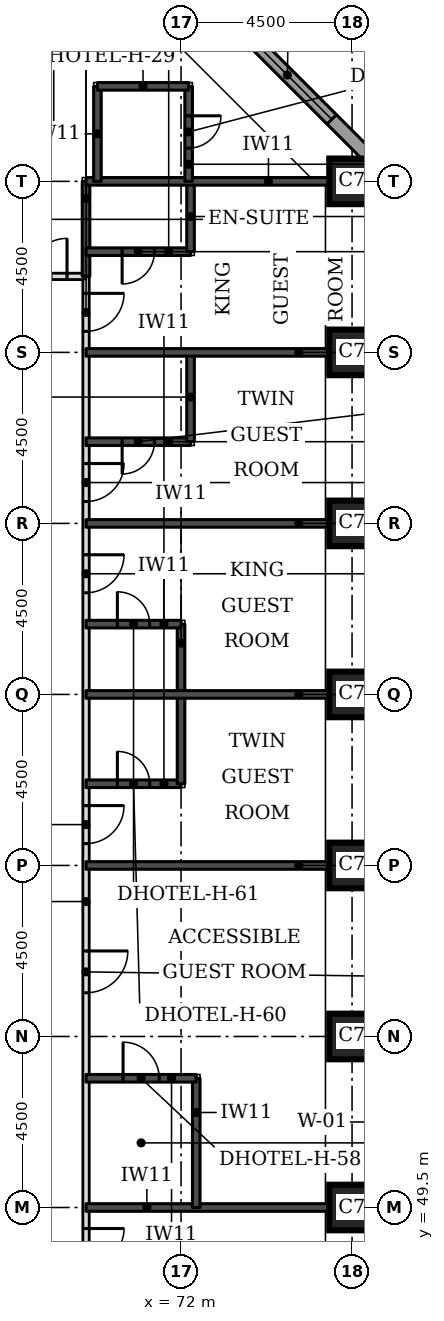
"""IFC4 building model, lengths in metres.
Left out: names, types, materials, properties, quantities, classifications, styles, units other than length and angle.
Written with IfcOpenShell. Run it as: python <this file> out.ifc"""

import sys

from ifc_helpers import new_model, si_unit, direction, frame, frame_2d, origin, origin_2d, place, context, subcontext, project, spatial, rectangle, extrude, element, fill, save


model = new_model("IFC4")
c1 = context("Model", 3, precision=1e-05, world=origin(), true_north=direction((0.0, 1.0)))
c2 = subcontext(c1, "Body", "Model", "MODEL_VIEW")
j1 = project(units=[si_unit("LENGTHUNIT", "METRE"), si_unit("PLANEANGLEUNIT", "RADIAN")], contexts=[c1])
p1 = place(None, origin())
s1 = spatial("IfcSite", under=j1, at=p1, CompositionType="ELEMENT")
p2 = place(p1, origin())
s2 = spatial("IfcBuilding", under=s1, at=p2, CompositionType="ELEMENT")
p3 = place(p2, frame((0.0, 0.0, 46.2)))
s3 = spatial("IfcBuildingStorey", under=s2, at=p3, CompositionType="ELEMENT", Elevation=46.2)
for number, where, z_axis, x_axis in (
    (1, (76.5, 49.5, 0.0), (0.0, 0.0, 1.0), (1.0, 0.0, 0.0)),
    (2, (76.5, 54.0, 0.0), (0.0, 0.0, 1.0), (1.0, 0.0, 0.0)),
    (3, (76.5, 58.5, 0.0), (0.0, 0.0, 1.0), (1.0, 0.0, 0.0)),
    (4, (76.5, 63.0, 0.0), (0.0, 0.0, 1.0), (1.0, 0.0, 0.0)),
    (5, (76.5, 67.5, 0.0), (0.0, 0.0, 1.0), (1.0, 0.0, 0.0)),
    (6, (76.5, 72.0, 0.0), (0.0, 0.0, 1.0), (1.0, 0.0, 0.0)),
    (7, (76.5, 76.5, 0.0), (0.0, 0.0, 1.0), (1.0, 0.0, 0.0)),
):
    element("IfcColumn", number, at=place(p3, frame(where, z_axis=z_axis, x_axis=x_axis)), inside=s3, PredefinedType="COLUMN", context=c2, shape_type="SweptSolid", body=[
        extrude(rectangle(XDim=1.2, YDim=1.2, at=origin_2d()), origin(), (0.0, 0.0, 1.0), 3.3),
    ])
p4 = place(p3, frame((77.326, 76.77, 0.0), z_axis=(0.0, 0.0, 1.0), x_axis=(-0.707106781187, 0.707106781187, 0.0)))
e8 = element("IfcWall", 8, at=p4, inside=s3, PredefinedType="STANDARD", context=c2, shape_type="SweptSolid", body=[
    extrude(rectangle(XDim=7.151, YDim=0.35, at=frame_2d((3.576, 0.0))), origin(), (0.0, 0.0, 1.0), 3.055),
])
p5 = place(p4, frame((1.926, 0.0, 0.8)))
e9 = element("IfcOpeningElement", 9, at=p5, cuts=e8, PredefinedType="OPENING", context=c2, shape_type="SweptSolid", body=[
    extrude(rectangle(XDim=3.3, YDim=1.5, at=frame_2d((1.65, 0.75))), frame((0.0, 0.185, 0.0), z_axis=(0.0, -1.0, 0.0), x_axis=(1.0, 0.0, 0.0)), (0.0, 0.0, 1.0), 0.37),
])
p6 = place(p3, frame((69.5, 47.5, 0.0), z_axis=(0.0, 0.0, 1.0), x_axis=(0.0, 1.0, 0.0)))
e10 = element("IfcWall", 10, at=p6, inside=s3, PredefinedType="PARTITIONING", context=c2, shape_type="SweptSolid", body=[
    extrude(rectangle(XDim=26.5, YDim=0.15, at=frame_2d((13.25, 0.0))), origin(), (0.0, 0.0, 1.0), 3.08),
])
p7 = place(p6, frame((25.053, 0.0, 0.0)))
e11 = element("IfcOpeningElement", 11, at=p7, cuts=e10, PredefinedType="OPENING", context=c2, shape_type="SweptSolid", body=[
    extrude(rectangle(XDim=1.0, YDim=2.1, at=frame_2d((0.5, 1.05))), frame((0.0, 0.085, 0.0), z_axis=(0.0, -1.0, 0.0), x_axis=(1.0, 0.0, 0.0)), (0.0, 0.0, 1.0), 0.17),
])
p8 = place(p6, frame((20.575, 0.0, 0.0)))
e12 = element("IfcOpeningElement", 12, at=p8, cuts=e10, PredefinedType="OPENING", context=c2, shape_type="SweptSolid", body=[
    extrude(rectangle(XDim=1.0, YDim=2.1, at=frame_2d((0.5, 1.05))), frame((0.0, 0.085, 0.0), z_axis=(0.0, -1.0, 0.0), x_axis=(1.0, 0.0, 0.0)), (0.0, 0.0, 1.0), 0.17),
])
p9 = place(p6, frame((18.175, 0.0, 0.0)))
e13 = element("IfcOpeningElement", 13, at=p9, cuts=e10, PredefinedType="OPENING", context=c2, shape_type="SweptSolid", body=[
    extrude(rectangle(XDim=1.0, YDim=2.1, at=frame_2d((0.5, 1.05))), frame((0.0, 0.085, 0.0), z_axis=(0.0, -1.0, 0.0), x_axis=(1.0, 0.0, 0.0)), (0.0, 0.0, 1.0), 0.17),
])
p10 = place(p6, frame((11.575, 0.0, 0.0)))
e14 = element("IfcOpeningElement", 14, at=p10, cuts=e10, PredefinedType="OPENING", context=c2, shape_type="SweptSolid", body=[
    extrude(rectangle(XDim=1.0, YDim=2.1, at=frame_2d((0.5, 1.05))), frame((0.0, 0.085, 0.0), z_axis=(0.0, -1.0, 0.0), x_axis=(1.0, 0.0, 0.0)), (0.0, 0.0, 1.0), 0.17),
])
p11 = place(p6, frame((7.65, 0.0, 0.0)))
e15 = element("IfcOpeningElement", 15, at=p11, cuts=e10, PredefinedType="OPENING", context=c2, shape_type="SweptSolid", body=[
    extrude(rectangle(XDim=1.1, YDim=2.1, at=frame_2d((0.55, 1.05))), frame((0.0, 0.085, 0.0), z_axis=(0.0, -1.0, 0.0), x_axis=(1.0, 0.0, 0.0)), (0.0, 0.0, 1.0), 0.17),
])
p12 = place(p6, frame((0.447, 0.0, 0.0)))
e16 = element("IfcOpeningElement", 16, at=p12, cuts=e10, PredefinedType="OPENING", context=c2, shape_type="SweptSolid", body=[
    extrude(rectangle(XDim=1.0, YDim=2.1, at=frame_2d((0.5, 1.05))), frame((0.0, 0.085, 0.0), z_axis=(0.0, -1.0, 0.0), x_axis=(1.0, 0.0, 0.0)), (0.0, 0.0, 1.0), 0.17),
])
p13 = place(p3, frame((43.0, 74.0, 0.0), z_axis=(0.0, 0.0, 1.0), x_axis=(1.0, 0.0, 0.0)))
e17 = element("IfcWall", 17, at=p13, inside=s3, PredefinedType="PARTITIONING", context=c2, shape_type="SweptSolid", body=[
    extrude(rectangle(XDim=26.5, YDim=0.15, at=frame_2d((13.25, 0.0))), origin(), (0.0, 0.0, 1.0), 3.08),
])
p14 = place(p13, frame((2.575, 0.0, 0.0)))
e18 = element("IfcOpeningElement", 18, at=p14, cuts=e17, PredefinedType="OPENING", context=c2, shape_type="SweptSolid", body=[
    extrude(rectangle(XDim=1.0, YDim=2.1, at=frame_2d((0.5, 1.05))), frame((0.0, 0.085, 0.0), z_axis=(0.0, -1.0, 0.0), x_axis=(1.0, 0.0, 0.0)), (0.0, 0.0, 1.0), 0.17),
])
p15 = place(p13, frame((9.175, 0.0, 0.0)))
e19 = element("IfcOpeningElement", 19, at=p15, cuts=e17, PredefinedType="OPENING", context=c2, shape_type="SweptSolid", body=[
    extrude(rectangle(XDim=1.0, YDim=2.1, at=frame_2d((0.5, 1.05))), frame((0.0, 0.085, 0.0), z_axis=(0.0, -1.0, 0.0), x_axis=(1.0, 0.0, 0.0)), (0.0, 0.0, 1.0), 0.17),
])
p16 = place(p13, frame((11.575, 0.0, 0.0)))
e20 = element("IfcOpeningElement", 20, at=p16, cuts=e17, PredefinedType="OPENING", context=c2, shape_type="SweptSolid", body=[
    extrude(rectangle(XDim=1.0, YDim=2.1, at=frame_2d((0.5, 1.05))), frame((0.0, 0.085, 0.0), z_axis=(0.0, -1.0, 0.0), x_axis=(1.0, 0.0, 0.0)), (0.0, 0.0, 1.0), 0.17),
])
p17 = place(p13, frame((18.175, 0.0, 0.0)))
e21 = element("IfcOpeningElement", 21, at=p17, cuts=e17, PredefinedType="OPENING", context=c2, shape_type="SweptSolid", body=[
    extrude(rectangle(XDim=1.0, YDim=2.1, at=frame_2d((0.5, 1.05))), frame((0.0, 0.085, 0.0), z_axis=(0.0, -1.0, 0.0), x_axis=(1.0, 0.0, 0.0)), (0.0, 0.0, 1.0), 0.17),
])
p18 = place(p13, frame((20.575, 0.0, 0.0)))
e22 = element("IfcOpeningElement", 22, at=p18, cuts=e17, PredefinedType="OPENING", context=c2, shape_type="SweptSolid", body=[
    extrude(rectangle(XDim=1.0, YDim=2.1, at=frame_2d((0.5, 1.05))), frame((0.0, 0.085, 0.0), z_axis=(0.0, -1.0, 0.0), x_axis=(1.0, 0.0, 0.0)), (0.0, 0.0, 1.0), 0.17),
])
p19 = place(p13, frame((0.5, 0.0, 0.0)))
e23 = element("IfcOpeningElement", 23, at=p19, cuts=e17, PredefinedType="OPENING", context=c2, shape_type="SweptSolid", body=[
    extrude(rectangle(XDim=1.0, YDim=2.1, at=frame_2d((0.5, 1.05))), frame((0.0, 0.085, 0.0), z_axis=(0.0, -1.0, 0.0), x_axis=(1.0, 0.0, 0.0)), (0.0, 0.0, 1.0), 0.17),
])
p20 = place(p13, frame((25.0, 0.0, 0.0)))
e24 = element("IfcOpeningElement", 24, at=p20, cuts=e17, PredefinedType="OPENING", context=c2, shape_type="SweptSolid", body=[
    extrude(rectangle(XDim=1.0, YDim=2.1, at=frame_2d((0.5, 1.05))), frame((0.0, 0.085, 0.0), z_axis=(0.0, -1.0, 0.0), x_axis=(1.0, 0.0, 0.0)), (0.0, 0.0, 1.0), 0.17),
])
p21 = place(p3, frame((69.5, 49.5, 0.0), z_axis=(0.0, 0.0, 1.0), x_axis=(1.0, 0.0, 0.0)))
e25 = element("IfcWall", 25, at=p21, inside=s3, PredefinedType="SOLIDWALL", context=c2, shape_type="SweptSolid", body=[
    extrude(rectangle(XDim=6.4, YDim=0.2, at=frame_2d((3.2, 0.0))), origin(), (0.0, 0.0, 1.0), 3.08),
])
p22 = place(p3, frame((72.4, 49.5, 0.0), z_axis=(0.0, 0.0, 1.0), x_axis=(0.0, 1.0, 0.0)))
e26 = element("IfcWall", 26, at=p22, inside=s3, PredefinedType="SOLIDWALL", context=c2, shape_type="SweptSolid", body=[
    extrude(rectangle(XDim=3.4, YDim=0.2, at=frame_2d((1.7, 0.0))), origin(), (0.0, 0.0, 1.0), 3.08),
])
p23 = place(p3, frame((69.5, 52.9, 0.0), z_axis=(0.0, 0.0, 1.0), x_axis=(1.0, 0.0, 0.0)))
e27 = element("IfcWall", 27, at=p23, inside=s3, PredefinedType="SOLIDWALL", context=c2, shape_type="SweptSolid", body=[
    extrude(rectangle(XDim=2.9, YDim=0.2, at=frame_2d((1.45, 0.0))), origin(), (0.0, 0.0, 1.0), 3.08),
])
p24 = place(p23, frame((0.975, 0.0, 0.0)))
e28 = element("IfcOpeningElement", 28, at=p24, cuts=e27, PredefinedType="OPENING", context=c2, shape_type="SweptSolid", body=[
    extrude(rectangle(XDim=0.95, YDim=2.1, at=frame_2d((0.475, 1.05))), frame((0.0, 0.11, 0.0), z_axis=(0.0, -1.0, 0.0), x_axis=(1.0, 0.0, 0.0)), (0.0, 0.0, 1.0), 0.22),
])
p25 = place(p3, frame((69.5, 58.5, 0.0), z_axis=(0.0, 0.0, 1.0), x_axis=(1.0, 0.0, 0.0)))
e29 = element("IfcWall", 29, at=p25, inside=s3, PredefinedType="SOLIDWALL", context=c2, shape_type="SweptSolid", body=[
    extrude(rectangle(XDim=6.4, YDim=0.2, at=frame_2d((3.2, 0.0))), origin(), (0.0, 0.0, 1.0), 3.08),
])
p26 = place(p3, frame((69.5, 60.65, 0.0), z_axis=(0.0, 0.0, 1.0), x_axis=(1.0, 0.0, 0.0)))
e30 = element("IfcWall", 30, at=p26, inside=s3, PredefinedType="SOLIDWALL", context=c2, shape_type="SweptSolid", body=[
    extrude(rectangle(XDim=2.5, YDim=0.2, at=frame_2d((1.25, 0.0))), origin(), (0.0, 0.0, 1.0), 3.08),
])
p27 = place(p26, frame((0.825, 0.0, 0.0)))
e31 = element("IfcOpeningElement", 31, at=p27, cuts=e30, PredefinedType="OPENING", context=c2, shape_type="SweptSolid", body=[
    extrude(rectangle(XDim=0.85, YDim=2.1, at=frame_2d((0.425, 1.05))), frame((0.0, 0.11, 0.0), z_axis=(0.0, -1.0, 0.0), x_axis=(1.0, 0.0, 0.0)), (0.0, 0.0, 1.0), 0.22),
])
p28 = place(p3, frame((72.0, 60.65, 0.0), z_axis=(0.0, 0.0, 1.0), x_axis=(0.0, 1.0, 0.0)))
e32 = element("IfcWall", 32, at=p28, inside=s3, PredefinedType="SOLIDWALL", context=c2, shape_type="SweptSolid", body=[
    extrude(rectangle(XDim=4.2, YDim=0.2, at=frame_2d((2.1, 0.0))), origin(), (0.0, 0.0, 1.0), 3.08),
])
p29 = place(p3, frame((69.5, 63.0, 0.0), z_axis=(0.0, 0.0, 1.0), x_axis=(1.0, 0.0, 0.0)))
e33 = element("IfcWall", 33, at=p29, inside=s3, PredefinedType="SOLIDWALL", context=c2, shape_type="SweptSolid", body=[
    extrude(rectangle(XDim=6.4, YDim=0.2, at=frame_2d((3.2, 0.0))), origin(), (0.0, 0.0, 1.0), 3.08),
])
p30 = place(p3, frame((69.5, 64.85, 0.0), z_axis=(0.0, 0.0, 1.0), x_axis=(1.0, 0.0, 0.0)))
e34 = element("IfcWall", 34, at=p30, inside=s3, PredefinedType="SOLIDWALL", context=c2, shape_type="SweptSolid", body=[
    extrude(rectangle(XDim=2.5, YDim=0.2, at=frame_2d((1.25, 0.0))), origin(), (0.0, 0.0, 1.0), 3.08),
])
p31 = place(p30, frame((0.825, 0.0, 0.0)))
e35 = element("IfcOpeningElement", 35, at=p31, cuts=e34, PredefinedType="OPENING", context=c2, shape_type="SweptSolid", body=[
    extrude(rectangle(XDim=0.85, YDim=2.1, at=frame_2d((0.425, 1.05))), frame((0.0, 0.11, 0.0), z_axis=(0.0, -1.0, 0.0), x_axis=(1.0, 0.0, 0.0)), (0.0, 0.0, 1.0), 0.22),
])
p32 = place(p3, frame((69.5, 67.5, 0.0), z_axis=(0.0, 0.0, 1.0), x_axis=(1.0, 0.0, 0.0)))
e36 = element("IfcWall", 36, at=p32, inside=s3, PredefinedType="SOLIDWALL", context=c2, shape_type="SweptSolid", body=[
    extrude(rectangle(XDim=6.4, YDim=0.2, at=frame_2d((3.2, 0.0))), origin(), (0.0, 0.0, 1.0), 3.08),
])
p33 = place(p3, frame((69.5, 69.65, 0.0), z_axis=(0.0, 0.0, 1.0), x_axis=(1.0, 0.0, 0.0)))
e37 = element("IfcWall", 37, at=p33, inside=s3, PredefinedType="SOLIDWALL", context=c2, shape_type="SweptSolid", body=[
    extrude(rectangle(XDim=2.75, YDim=0.2, at=frame_2d((1.375, 0.0))), origin(), (0.0, 0.0, 1.0), 3.08),
])
p34 = place(p33, frame((0.95, 0.0, 0.0)))
e38 = element("IfcOpeningElement", 38, at=p34, cuts=e37, PredefinedType="OPENING", context=c2, shape_type="SweptSolid", body=[
    extrude(rectangle(XDim=0.85, YDim=2.1, at=frame_2d((0.425, 1.05))), frame((0.0, 0.11, 0.0), z_axis=(0.0, -1.0, 0.0), x_axis=(1.0, 0.0, 0.0)), (0.0, 0.0, 1.0), 0.22),
])
p35 = place(p3, frame((72.25, 69.65, 0.0), z_axis=(0.0, 0.0, 1.0), x_axis=(0.0, 1.0, 0.0)))
e39 = element("IfcWall", 39, at=p35, inside=s3, PredefinedType="SOLIDWALL", context=c2, shape_type="SweptSolid", body=[
    extrude(rectangle(XDim=2.35, YDim=0.2, at=frame_2d((1.175, 0.0))), origin(), (0.0, 0.0, 1.0), 3.08),
])
p36 = place(p3, frame((69.5, 72.0, 0.0), z_axis=(0.0, 0.0, 1.0), x_axis=(1.0, 0.0, 0.0)))
e40 = element("IfcWall", 40, at=p36, inside=s3, PredefinedType="SOLIDWALL", context=c2, shape_type="SweptSolid", body=[
    extrude(rectangle(XDim=6.4, YDim=0.2, at=frame_2d((3.2, 0.0))), origin(), (0.0, 0.0, 1.0), 3.08),
])
p37 = place(p3, frame((69.5, 74.0, 0.0), z_axis=(0.0, 0.0, 1.0), x_axis=(0.0, 1.0, 0.0)))
e41 = element("IfcWall", 41, at=p37, inside=s3, PredefinedType="SOLIDWALL", context=c2, shape_type="SweptSolid", body=[
    extrude(rectangle(XDim=2.5, YDim=0.2, at=frame_2d((1.25, 0.0))), origin(), (0.0, 0.0, 1.0), 3.08),
])
p38 = place(p3, frame((69.5, 74.65, 0.0), z_axis=(0.0, 0.0, 1.0), x_axis=(1.0, 0.0, 0.0)))
e42 = element("IfcWall", 42, at=p38, inside=s3, PredefinedType="SOLIDWALL", context=c2, shape_type="SweptSolid", body=[
    extrude(rectangle(XDim=2.75, YDim=0.2, at=frame_2d((1.375, 0.0))), origin(), (0.0, 0.0, 1.0), 3.08),
])
p39 = place(p38, frame((0.95, 0.0, 0.0)))
e43 = element("IfcOpeningElement", 43, at=p39, cuts=e42, PredefinedType="OPENING", context=c2, shape_type="SweptSolid", body=[
    extrude(rectangle(XDim=0.85, YDim=2.1, at=frame_2d((0.425, 1.05))), frame((0.0, 0.11, 0.0), z_axis=(0.0, -1.0, 0.0), x_axis=(1.0, 0.0, 0.0)), (0.0, 0.0, 1.0), 0.22),
])
p40 = place(p3, frame((72.25, 74.65, 0.0), z_axis=(0.0, 0.0, 1.0), x_axis=(0.0, 1.0, 0.0)))
e44 = element("IfcWall", 44, at=p40, inside=s3, PredefinedType="SOLIDWALL", context=c2, shape_type="SweptSolid", body=[
    extrude(rectangle(XDim=1.85, YDim=0.2, at=frame_2d((0.925, 0.0))), origin(), (0.0, 0.0, 1.0), 3.08),
])
p41 = place(p3, frame((69.5, 76.5, 0.0), z_axis=(0.0, 0.0, 1.0), x_axis=(1.0, 0.0, 0.0)))
e45 = element("IfcWall", 45, at=p41, inside=s3, PredefinedType="SOLIDWALL", context=c2, shape_type="SweptSolid", body=[
    extrude(rectangle(XDim=6.4, YDim=0.2, at=frame_2d((3.2, 0.0))), origin(), (0.0, 0.0, 1.0), 3.08),
])
p42 = place(p3, frame((69.8, 76.5, 0.0), z_axis=(0.0, 0.0, 1.0), x_axis=(0.0, 1.0, 0.0)))
e46 = element("IfcWall", 46, at=p42, inside=s3, PredefinedType="SOLIDWALL", context=c2, shape_type="SweptSolid", body=[
    extrude(rectangle(XDim=2.5, YDim=0.2, at=frame_2d((1.25, 0.0))), origin(), (0.0, 0.0, 1.0), 3.08),
])
p43 = place(p3, frame((72.2, 76.5, 0.0), z_axis=(0.0, 0.0, 1.0), x_axis=(0.0, 1.0, 0.0)))
e47 = element("IfcWall", 47, at=p43, inside=s3, PredefinedType="SOLIDWALL", context=c2, shape_type="SweptSolid", body=[
    extrude(rectangle(XDim=2.5, YDim=0.2, at=frame_2d((1.25, 0.0))), origin(), (0.0, 0.0, 1.0), 3.08),
])
p44 = place(p43, frame((0.875, 0.0, 0.0)))
e48 = element("IfcOpeningElement", 48, at=p44, cuts=e47, PredefinedType="OPENING", context=c2, shape_type="SweptSolid", body=[
    extrude(rectangle(XDim=0.85, YDim=2.1, at=frame_2d((0.425, 1.05))), frame((0.0, 0.11, 0.0), z_axis=(0.0, -1.0, 0.0), x_axis=(1.0, 0.0, 0.0)), (0.0, 0.0, 1.0), 0.22),
])
p45 = place(p3, frame((69.8, 79.0, 0.0), z_axis=(0.0, 0.0, 1.0), x_axis=(1.0, 0.0, 0.0)))
e49 = element("IfcWall", 49, at=p45, inside=s3, PredefinedType="SOLIDWALL", context=c2, shape_type="SweptSolid", body=[
    extrude(rectangle(XDim=2.4, YDim=0.2, at=frame_2d((1.2, 0.0))), origin(), (0.0, 0.0, 1.0), 3.08),
])
p46 = place(p5, origin())
e50 = element("IfcWindow", 50, at=p46, inside=s3, PartitioningType="SINGLE_PANEL", PredefinedType="WINDOW", context=c2, shape_type="SweptSolid", body=[
    extrude(rectangle(XDim=3.3, YDim=1.5, at=frame_2d((1.65, 0.75))), frame((0.0, 0.085, 0.0), z_axis=(0.0, -1.0, 0.0), x_axis=(1.0, 0.0, 0.0)), (0.0, 0.0, 1.0), 0.06),
])
fill(e9, e50)
p47 = place(p7, frame((1.0, 0.0, 0.0), z_axis=(0.0, 0.0, 1.0), x_axis=(-1.0, 0.0, 0.0)))
e51 = element("IfcDoor", 51, at=p47, inside=s3, OperationType="SINGLE_SWING_LEFT", PredefinedType="DOOR", context=c2, shape_type="SweptSolid", body=[
    extrude(rectangle(XDim=1.0, YDim=2.1, at=frame_2d((0.5, 1.05))), frame((0.0, 0.025, 0.0), z_axis=(0.0, -1.0, 0.0), x_axis=(1.0, 0.0, 0.0)), (0.0, 0.0, 1.0), 0.05),
])
fill(e11, e51)
p48 = place(p39, frame((0.85, 0.0, 0.0), z_axis=(0.0, 0.0, 1.0), x_axis=(-1.0, 0.0, 0.0)))
e52 = element("IfcDoor", 52, at=p48, inside=s3, OperationType="SINGLE_SWING_RIGHT", PredefinedType="DOOR", context=c2, shape_type="SweptSolid", body=[
    extrude(rectangle(XDim=0.85, YDim=2.1, at=frame_2d((0.425, 1.05))), frame((0.0, 0.025, 0.0), z_axis=(0.0, -1.0, 0.0), x_axis=(1.0, 0.0, 0.0)), (0.0, 0.0, 1.0), 0.05),
])
fill(e43, e52)
p49 = place(p8, frame((1.0, 0.0, 0.0), z_axis=(0.0, 0.0, 1.0), x_axis=(-1.0, 0.0, 0.0)))
e53 = element("IfcDoor", 53, at=p49, inside=s3, OperationType="SINGLE_SWING_LEFT", PredefinedType="DOOR", context=c2, shape_type="SweptSolid", body=[
    extrude(rectangle(XDim=1.0, YDim=2.1, at=frame_2d((0.5, 1.05))), frame((0.0, 0.025, 0.0), z_axis=(0.0, -1.0, 0.0), x_axis=(1.0, 0.0, 0.0)), (0.0, 0.0, 1.0), 0.05),
])
fill(e12, e53)
p50 = place(p34, frame((0.85, 0.0, 0.0), z_axis=(0.0, 0.0, 1.0), x_axis=(-1.0, 0.0, 0.0)))
e54 = element("IfcDoor", 54, at=p50, inside=s3, OperationType="SINGLE_SWING_RIGHT", PredefinedType="DOOR", context=c2, shape_type="SweptSolid", body=[
    extrude(rectangle(XDim=0.85, YDim=2.1, at=frame_2d((0.425, 1.05))), frame((0.0, 0.025, 0.0), z_axis=(0.0, -1.0, 0.0), x_axis=(1.0, 0.0, 0.0)), (0.0, 0.0, 1.0), 0.05),
])
fill(e38, e54)
p51 = place(p9, frame((1.0, 0.0, 0.0), z_axis=(0.0, 0.0, 1.0), x_axis=(-1.0, 0.0, 0.0)))
e55 = element("IfcDoor", 55, at=p51, inside=s3, OperationType="SINGLE_SWING_LEFT", PredefinedType="DOOR", context=c2, shape_type="SweptSolid", body=[
    extrude(rectangle(XDim=1.0, YDim=2.1, at=frame_2d((0.5, 1.05))), frame((0.0, 0.025, 0.0), z_axis=(0.0, -1.0, 0.0), x_axis=(1.0, 0.0, 0.0)), (0.0, 0.0, 1.0), 0.05),
])
fill(e13, e55)
p52 = place(p31, origin())
e56 = element("IfcDoor", 56, at=p52, inside=s3, OperationType="SINGLE_SWING_LEFT", PredefinedType="DOOR", context=c2, shape_type="SweptSolid", body=[
    extrude(rectangle(XDim=0.85, YDim=2.1, at=frame_2d((0.425, 1.05))), frame((0.0, 0.025, 0.0), z_axis=(0.0, -1.0, 0.0), x_axis=(1.0, 0.0, 0.0)), (0.0, 0.0, 1.0), 0.05),
])
fill(e35, e56)
p53 = place(p10, frame((1.0, 0.0, 0.0), z_axis=(0.0, 0.0, 1.0), x_axis=(-1.0, 0.0, 0.0)))
e57 = element("IfcDoor", 57, at=p53, inside=s3, OperationType="SINGLE_SWING_LEFT", PredefinedType="DOOR", context=c2, shape_type="SweptSolid", body=[
    extrude(rectangle(XDim=1.0, YDim=2.1, at=frame_2d((0.5, 1.05))), frame((0.0, 0.025, 0.0), z_axis=(0.0, -1.0, 0.0), x_axis=(1.0, 0.0, 0.0)), (0.0, 0.0, 1.0), 0.05),
])
fill(e14, e57)
p54 = place(p27, origin())
e58 = element("IfcDoor", 58, at=p54, inside=s3, OperationType="SINGLE_SWING_LEFT", PredefinedType="DOOR", context=c2, shape_type="SweptSolid", body=[
    extrude(rectangle(XDim=0.85, YDim=2.1, at=frame_2d((0.425, 1.05))), frame((0.0, 0.025, 0.0), z_axis=(0.0, -1.0, 0.0), x_axis=(1.0, 0.0, 0.0)), (0.0, 0.0, 1.0), 0.05),
])
fill(e31, e58)
p55 = place(p11, frame((1.1, 0.0, 0.0), z_axis=(0.0, 0.0, 1.0), x_axis=(-1.0, 0.0, 0.0)))
e59 = element("IfcDoor", 59, at=p55, inside=s3, OperationType="SINGLE_SWING_LEFT", PredefinedType="DOOR", context=c2, shape_type="SweptSolid", body=[
    extrude(rectangle(XDim=1.1, YDim=2.1, at=frame_2d((0.55, 1.05))), frame((0.0, 0.025, 0.0), z_axis=(0.0, -1.0, 0.0), x_axis=(1.0, 0.0, 0.0)), (0.0, 0.0, 1.0), 0.05),
])
fill(e15, e59)
p56 = place(p24, origin())
e60 = element("IfcDoor", 60, at=p56, inside=s3, OperationType="SINGLE_SWING_LEFT", PredefinedType="DOOR", context=c2, shape_type="SweptSolid", body=[
    extrude(rectangle(XDim=0.95, YDim=2.1, at=frame_2d((0.475, 1.05))), frame((0.0, 0.025, 0.0), z_axis=(0.0, -1.0, 0.0), x_axis=(1.0, 0.0, 0.0)), (0.0, 0.0, 1.0), 0.05),
])
fill(e28, e60)
p57 = place(p12, frame((1.0, 0.0, 0.0), z_axis=(0.0, 0.0, 1.0), x_axis=(-1.0, 0.0, 0.0)))
e61 = element("IfcDoor", 61, at=p57, inside=s3, OperationType="SINGLE_SWING_LEFT", PredefinedType="DOOR", context=c2, shape_type="SweptSolid", body=[
    extrude(rectangle(XDim=1.0, YDim=2.1, at=frame_2d((0.5, 1.05))), frame((0.0, 0.025, 0.0), z_axis=(0.0, -1.0, 0.0), x_axis=(1.0, 0.0, 0.0)), (0.0, 0.0, 1.0), 0.05),
])
fill(e16, e61)
p58 = place(p20, origin())
e62 = element("IfcDoor", 62, at=p58, inside=s3, OperationType="SINGLE_SWING_RIGHT", PredefinedType="DOOR", context=c2, shape_type="SweptSolid", body=[
    extrude(rectangle(XDim=1.0, YDim=2.1, at=frame_2d((0.5, 1.05))), frame((0.0, 0.025, 0.0), z_axis=(0.0, -1.0, 0.0), x_axis=(1.0, 0.0, 0.0)), (0.0, 0.0, 1.0), 0.05),
])
fill(e24, e62)
p59 = place(p44, frame((0.85, 0.0, 0.0), z_axis=(0.0, 0.0, 1.0), x_axis=(-1.0, 0.0, 0.0)))
e63 = element("IfcDoor", 63, at=p59, inside=s3, OperationType="SINGLE_SWING_LEFT", PredefinedType="DOOR", context=c2, shape_type="SweptSolid", body=[
    extrude(rectangle(XDim=0.85, YDim=2.1, at=frame_2d((0.425, 1.05))), frame((0.0, 0.025, 0.0), z_axis=(0.0, -1.0, 0.0), x_axis=(1.0, 0.0, 0.0)), (0.0, 0.0, 1.0), 0.05),
])
fill(e48, e63)
save(model, sys.argv[1])
